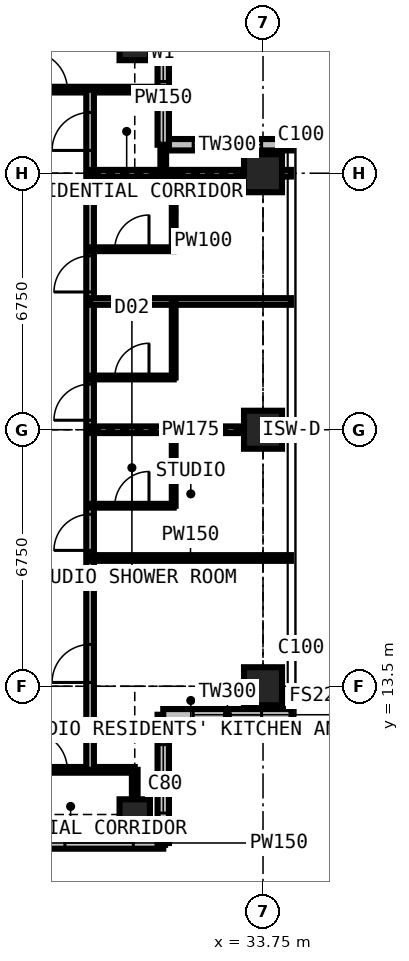
"""IFC4 building model, lengths in metres.
Left out: names, types, materials, properties, quantities, classifications, styles, units other than length and angle.
Written with IfcOpenShell. Run it as: python <this file> out.ifc"""

import sys

from ifc_helpers import new_model, si_unit, direction, frame, frame_2d, origin, origin_2d, place, context, subcontext, project, spatial, rectangle, extrude, element, fill, save


model = new_model("IFC4")
c1 = context("Model", 3, precision=1e-05, world=origin(), true_north=direction((0.0, 1.0)))
c2 = subcontext(c1, "Body", "Model", "MODEL_VIEW")
j1 = project(units=[si_unit("LENGTHUNIT", "METRE"), si_unit("PLANEANGLEUNIT", "RADIAN")], contexts=[c1])
p1 = place(None, origin())
s1 = spatial("IfcSite", under=j1, at=p1, CompositionType="ELEMENT")
p2 = place(p1, origin())
s2 = spatial("IfcBuilding", under=s1, at=p2, CompositionType="ELEMENT")
p3 = place(p2, frame((0.0, 0.0, 233.1)))
s3 = spatial("IfcBuildingStorey", under=s2, at=p3, CompositionType="ELEMENT", Elevation=233.1)
for number, where, z_axis, x_axis in (
    (1, (30.375, 10.125, 0.0), (0.0, 0.0, 1.0), (1.0, 0.0, 0.0)),
    (2, (30.375, 30.375, 0.0), (0.0, 0.0, 1.0), (1.0, 0.0, 0.0)),
):
    element("IfcColumn", number, at=place(p3, frame(where, z_axis=z_axis, x_axis=x_axis)), inside=s3, PredefinedType="COLUMN", context=c2, shape_type="SweptSolid", body=[
        extrude(rectangle(XDim=0.8, YDim=0.8, at=origin_2d()), origin(), (0.0, 0.0, 1.0), 3.6),
    ])
for number, where, z_axis, x_axis in (
    (3, (33.75, 13.5, 0.0), (0.0, 0.0, 1.0), (1.0, 0.0, 0.0)),
    (4, (33.75, 20.25, 0.0), (0.0, 0.0, 1.0), (1.0, 0.0, 0.0)),
    (5, (33.75, 27.0, 0.0), (0.0, 0.0, 1.0), (1.0, 0.0, 0.0)),
):
    element("IfcColumn", number, at=place(p3, frame(where, z_axis=z_axis, x_axis=x_axis)), inside=s3, PredefinedType="COLUMN", context=c2, shape_type="SweptSolid", body=[
        extrude(rectangle(XDim=1.0, YDim=1.0, at=origin_2d()), origin(), (0.0, 0.0, 1.0), 3.6),
    ])
p4 = place(p3, frame((34.5, 27.75, 0.0), z_axis=(0.0, 0.0, 1.0), x_axis=(-1.0, 0.0, 0.0)))
e6 = element("IfcWall", 6, at=p4, inside=s3, PredefinedType="SOLIDWALL", context=c2, shape_type="SweptSolid", body=[
    extrude(rectangle(XDim=3.375, YDim=0.3, at=frame_2d((1.688, 0.0))), origin(), (0.0, 0.0, 1.0), 3.375),
])
p5 = place(p4, frame((0.788, 0.0, 0.6)))
e7 = element("IfcOpeningElement", 7, at=p5, cuts=e6, PredefinedType="OPENING", context=c2, shape_type="SweptSolid", body=[
    extrude(rectangle(XDim=1.8, YDim=2.1, at=frame_2d((0.9, 1.05))), frame((0.0, 0.16, 0.0), z_axis=(0.0, -1.0, 0.0), x_axis=(1.0, 0.0, 0.0)), (0.0, 0.0, 1.0), 0.32),
])
p6 = place(p3, frame((31.125, 27.75, 0.0), z_axis=(0.0, 0.0, 1.0), x_axis=(0.0, 1.0, 0.0)))
e8 = element("IfcWall", 8, at=p6, inside=s3, PredefinedType="SOLIDWALL", context=c2, shape_type="SweptSolid", body=[
    extrude(rectangle(XDim=3.375, YDim=0.3, at=frame_2d((1.688, 0.0))), origin(), (0.0, 0.0, 1.0), 3.375),
])
p7 = place(p6, frame((1.663, 0.0, 0.9)))
e9 = element("IfcOpeningElement", 9, at=p7, cuts=e8, PredefinedType="OPENING", context=c2, shape_type="SweptSolid", body=[
    extrude(rectangle(XDim=1.5, YDim=1.8, at=frame_2d((0.75, 0.9))), frame((0.0, 0.16, 0.0), z_axis=(0.0, -1.0, 0.0), x_axis=(1.0, 0.0, 0.0)), (0.0, 0.0, 1.0), 0.32),
])
p8 = place(p3, frame((27.75, 9.375, 0.0), z_axis=(0.0, 0.0, 1.0), x_axis=(1.0, 0.0, 0.0)))
e10 = element("IfcWall", 10, at=p8, inside=s3, PredefinedType="SOLIDWALL", context=c2, shape_type="SweptSolid", body=[
    extrude(rectangle(XDim=3.375, YDim=0.3, at=frame_2d((1.688, 0.0))), origin(), (0.0, 0.0, 1.0), 3.375),
])
p9 = place(p8, frame((0.788, 0.0, 0.6)))
e11 = element("IfcOpeningElement", 11, at=p9, cuts=e10, PredefinedType="OPENING", context=c2, shape_type="SweptSolid", body=[
    extrude(rectangle(XDim=1.8, YDim=2.1, at=frame_2d((0.9, 1.05))), frame((0.0, 0.16, 0.0), z_axis=(0.0, -1.0, 0.0), x_axis=(1.0, 0.0, 0.0)), (0.0, 0.0, 1.0), 0.32),
])
p10 = place(p3, frame((31.125, 9.375, 0.0), z_axis=(0.0, 0.0, 1.0), x_axis=(0.0, 1.0, 0.0)))
e12 = element("IfcWall", 12, at=p10, inside=s3, PredefinedType="SOLIDWALL", context=c2, shape_type="SweptSolid", body=[
    extrude(rectangle(XDim=3.375, YDim=0.3, at=frame_2d((1.688, 0.0))), origin(), (0.0, 0.0, 1.0), 3.375),
])
p11 = place(p10, frame((0.788, 0.0, 0.6)))
e13 = element("IfcOpeningElement", 13, at=p11, cuts=e12, PredefinedType="OPENING", context=c2, shape_type="SweptSolid", body=[
    extrude(rectangle(XDim=1.8, YDim=2.1, at=frame_2d((0.9, 1.05))), frame((0.0, 0.16, 0.0), z_axis=(0.0, -1.0, 0.0), x_axis=(1.0, 0.0, 0.0)), (0.0, 0.0, 1.0), 0.32),
])
p12 = place(p3, frame((31.125, 12.75, 0.0), z_axis=(0.0, 0.0, 1.0), x_axis=(1.0, 0.0, 0.0)))
e14 = element("IfcWall", 14, at=p12, inside=s3, PredefinedType="SOLIDWALL", context=c2, shape_type="SweptSolid", body=[
    extrude(rectangle(XDim=3.375, YDim=0.3, at=frame_2d((1.688, 0.0))), origin(), (0.0, 0.0, 1.0), 3.375),
])
p13 = place(p12, frame((0.788, 0.0, 0.6)))
e15 = element("IfcOpeningElement", 15, at=p13, cuts=e14, PredefinedType="OPENING", context=c2, shape_type="SweptSolid", body=[
    extrude(rectangle(XDim=1.8, YDim=2.1, at=frame_2d((0.9, 1.05))), frame((0.0, 0.16, 0.0), z_axis=(0.0, -1.0, 0.0), x_axis=(1.0, 0.0, 0.0)), (0.0, 0.0, 1.0), 0.32),
])
p14 = place(p3, frame((11.3, 29.2, 0.0), z_axis=(0.0, 0.0, 1.0), x_axis=(1.0, 0.0, 0.0)))
e16 = element("IfcWall", 16, at=p14, inside=s3, PredefinedType="PARTITIONING", context=c2, shape_type="SweptSolid", body=[
    extrude(rectangle(XDim=19.809, YDim=0.15, at=frame_2d((9.904, 0.0))), origin(), (0.0, 0.0, 1.0), 3.375),
])
p15 = place(p14, frame((16.3, 0.0, 0.0)))
e17 = element("IfcOpeningElement", 17, at=p15, cuts=e16, PredefinedType="OPENING", context=c2, shape_type="SweptSolid", body=[
    extrude(rectangle(XDim=1.0, YDim=2.2, at=frame_2d((0.5, 1.1))), frame((0.0, 0.085, 0.0), z_axis=(0.0, -1.0, 0.0), x_axis=(1.0, 0.0, 0.0)), (0.0, 0.0, 1.0), 0.17),
])
p16 = place(p14, frame((5.825, 0.0, 0.0)))
e18 = element("IfcOpeningElement", 18, at=p16, cuts=e16, PredefinedType="OPENING", context=c2, shape_type="SweptSolid", body=[
    extrude(rectangle(XDim=0.95, YDim=2.2, at=frame_2d((0.475, 1.1))), frame((0.0, 0.085, 0.0), z_axis=(0.0, -1.0, 0.0), x_axis=(1.0, 0.0, 0.0)), (0.0, 0.0, 1.0), 0.17),
])
p17 = place(p14, frame((9.2, 0.0, 0.0)))
e19 = element("IfcOpeningElement", 19, at=p17, cuts=e16, PredefinedType="OPENING", context=c2, shape_type="SweptSolid", body=[
    extrude(rectangle(XDim=0.95, YDim=2.2, at=frame_2d((0.475, 1.1))), frame((0.0, 0.085, 0.0), z_axis=(0.0, -1.0, 0.0), x_axis=(1.0, 0.0, 0.0)), (0.0, 0.0, 1.0), 0.17),
])
p18 = place(p14, frame((12.575, 0.0, 0.0)))
e20 = element("IfcOpeningElement", 20, at=p18, cuts=e16, PredefinedType="OPENING", context=c2, shape_type="SweptSolid", body=[
    extrude(rectangle(XDim=0.95, YDim=2.2, at=frame_2d((0.475, 1.1))), frame((0.0, 0.085, 0.0), z_axis=(0.0, -1.0, 0.0), x_axis=(1.0, 0.0, 0.0)), (0.0, 0.0, 1.0), 0.17),
])
p19 = place(p14, frame((0.6, 0.0, 0.0)))
e21 = element("IfcOpeningElement", 21, at=p19, cuts=e16, PredefinedType="OPENING", context=c2, shape_type="SweptSolid", body=[
    extrude(rectangle(XDim=1.0, YDim=2.2, at=frame_2d((0.5, 1.1))), frame((0.0, 0.085, 0.0), z_axis=(0.0, -1.0, 0.0), x_axis=(1.0, 0.0, 0.0)), (0.0, 0.0, 1.0), 0.17),
])
p20 = place(p3, frame((27.0, 11.3, 0.0), z_axis=(0.0, 0.0, 1.0), x_axis=(1.0, 0.0, 0.0)))
e22 = element("IfcWall", 22, at=p20, inside=s3, PredefinedType="PARTITIONING", context=c2, shape_type="SweptSolid", body=[
    extrude(rectangle(XDim=3.375, YDim=0.15, at=frame_2d((1.688, 0.0))), origin(), (0.0, 0.0, 1.0), 3.375),
])
p21 = place(p20, frame((0.6, 0.0, 0.0)))
e23 = element("IfcOpeningElement", 23, at=p21, cuts=e22, PredefinedType="OPENING", context=c2, shape_type="SweptSolid", body=[
    extrude(rectangle(XDim=1.0, YDim=2.2, at=frame_2d((0.5, 1.1))), frame((0.0, 0.085, 0.0), z_axis=(0.0, -1.0, 0.0), x_axis=(1.0, 0.0, 0.0)), (0.0, 0.0, 1.0), 0.17),
])
p22 = place(p3, frame((29.2, 11.3, 0.0), z_axis=(0.0, 0.0, 1.0), x_axis=(0.0, 1.0, 0.0)))
e24 = element("IfcWall", 24, at=p22, inside=s3, PredefinedType="PARTITIONING", context=c2, shape_type="SweptSolid", body=[
    extrude(rectangle(XDim=17.9, YDim=0.2, at=frame_2d((8.95, 0.0))), origin(), (0.0, 0.0, 1.0), 3.375),
])
p23 = place(p22, frame((2.3, 0.0, 0.0)))
e25 = element("IfcOpeningElement", 25, at=p23, cuts=e24, PredefinedType="OPENING", context=c2, shape_type="SweptSolid", body=[
    extrude(rectangle(XDim=1.0, YDim=2.2, at=frame_2d((0.5, 1.1))), frame((0.0, 0.11, 0.0), z_axis=(0.0, -1.0, 0.0), x_axis=(1.0, 0.0, 0.0)), (0.0, 0.0, 1.0), 0.22),
])
p24 = place(p22, frame((5.775, 0.0, 0.0)))
e26 = element("IfcOpeningElement", 26, at=p24, cuts=e24, PredefinedType="OPENING", context=c2, shape_type="SweptSolid", body=[
    extrude(rectangle(XDim=0.95, YDim=2.2, at=frame_2d((0.475, 1.1))), frame((0.0, 0.11, 0.0), z_axis=(0.0, -1.0, 0.0), x_axis=(1.0, 0.0, 0.0)), (0.0, 0.0, 1.0), 0.22),
])
p25 = place(p22, frame((9.2, 0.0, 0.0)))
e27 = element("IfcOpeningElement", 27, at=p25, cuts=e24, PredefinedType="OPENING", context=c2, shape_type="SweptSolid", body=[
    extrude(rectangle(XDim=0.95, YDim=2.2, at=frame_2d((0.475, 1.1))), frame((0.0, 0.11, 0.0), z_axis=(0.0, -1.0, 0.0), x_axis=(1.0, 0.0, 0.0)), (0.0, 0.0, 1.0), 0.22),
])
p26 = place(p22, frame((12.575, 0.0, 0.0)))
e28 = element("IfcOpeningElement", 28, at=p26, cuts=e24, PredefinedType="OPENING", context=c2, shape_type="SweptSolid", body=[
    extrude(rectangle(XDim=0.95, YDim=2.2, at=frame_2d((0.475, 1.1))), frame((0.0, 0.11, 0.0), z_axis=(0.0, -1.0, 0.0), x_axis=(1.0, 0.0, 0.0)), (0.0, 0.0, 1.0), 0.22),
])
p27 = place(p22, frame((16.3, 0.0, 0.0)))
e29 = element("IfcOpeningElement", 29, at=p27, cuts=e24, PredefinedType="OPENING", context=c2, shape_type="SweptSolid", body=[
    extrude(rectangle(XDim=1.0, YDim=2.2, at=frame_2d((0.5, 1.1))), frame((0.0, 0.11, 0.0), z_axis=(0.0, -1.0, 0.0), x_axis=(1.0, 0.0, 0.0)), (0.0, 0.0, 1.0), 0.22),
])
p28 = place(p3, frame((29.2, 16.875, 0.0), z_axis=(0.0, 0.0, 1.0), x_axis=(1.0, 0.0, 0.0)))
e30 = element("IfcWall", 30, at=p28, inside=s3, PredefinedType="PARTITIONING", context=c2, shape_type="SweptSolid", body=[
    extrude(rectangle(XDim=5.284, YDim=0.15, at=frame_2d((2.642, 0.0))), origin(), (0.0, 0.0, 1.0), 3.375),
])
p29 = place(p3, frame((29.2, 18.25, 0.0), z_axis=(0.0, 0.0, 1.0), x_axis=(1.0, 0.0, 0.0)))
e31 = element("IfcWall", 31, at=p29, inside=s3, PredefinedType="PARTITIONING", context=c2, shape_type="SweptSolid", body=[
    extrude(rectangle(XDim=2.2, YDim=0.1, at=frame_2d((1.1, 0.0))), origin(), (0.0, 0.0, 1.0), 3.375),
])
p30 = place(p29, frame((0.65, 0.0, 0.0)))
e32 = element("IfcOpeningElement", 32, at=p30, cuts=e31, PredefinedType="OPENING", context=c2, shape_type="SweptSolid", body=[
    extrude(rectangle(XDim=0.9, YDim=2.2, at=frame_2d((0.45, 1.1))), frame((0.0, 0.06, 0.0), z_axis=(0.0, -1.0, 0.0), x_axis=(1.0, 0.0, 0.0)), (0.0, 0.0, 1.0), 0.12),
])
p31 = place(p3, frame((29.2, 20.25, 0.0), z_axis=(0.0, 0.0, 1.0), x_axis=(1.0, 0.0, 0.0)))
e33 = element("IfcWall", 33, at=p31, inside=s3, PredefinedType="PARTITIONING", context=c2, shape_type="SweptSolid", body=[
    extrude(rectangle(XDim=5.284, YDim=0.175, at=frame_2d((2.642, 0.0))), origin(), (0.0, 0.0, 1.0), 2.877),
])
p32 = place(p3, frame((29.2, 21.625, 0.0), z_axis=(0.0, 0.0, 1.0), x_axis=(1.0, 0.0, 0.0)))
e34 = element("IfcWall", 34, at=p32, inside=s3, PredefinedType="PARTITIONING", context=c2, shape_type="SweptSolid", body=[
    extrude(rectangle(XDim=2.2, YDim=0.1, at=frame_2d((1.1, 0.0))), origin(), (0.0, 0.0, 1.0), 3.375),
])
p33 = place(p32, frame((0.65, 0.0, 0.0)))
e35 = element("IfcOpeningElement", 35, at=p33, cuts=e34, PredefinedType="OPENING", context=c2, shape_type="SweptSolid", body=[
    extrude(rectangle(XDim=0.9, YDim=2.2, at=frame_2d((0.45, 1.1))), frame((0.0, 0.06, 0.0), z_axis=(0.0, -1.0, 0.0), x_axis=(1.0, 0.0, 0.0)), (0.0, 0.0, 1.0), 0.12),
])
p34 = place(p3, frame((29.2, 23.625, 0.0), z_axis=(0.0, 0.0, 1.0), x_axis=(1.0, 0.0, 0.0)))
e36 = element("IfcWall", 36, at=p34, inside=s3, PredefinedType="PARTITIONING", context=c2, shape_type="SweptSolid", body=[
    extrude(rectangle(XDim=5.284, YDim=0.175, at=frame_2d((2.642, 0.0))), origin(), (0.0, 0.0, 1.0), 3.375),
])
p35 = place(p3, frame((29.2, 25.0, 0.0), z_axis=(0.0, 0.0, 1.0), x_axis=(1.0, 0.0, 0.0)))
e37 = element("IfcWall", 37, at=p35, inside=s3, PredefinedType="PARTITIONING", context=c2, shape_type="SweptSolid", body=[
    extrude(rectangle(XDim=2.2, YDim=0.1, at=frame_2d((1.1, 0.0))), origin(), (0.0, 0.0, 1.0), 3.375),
])
p36 = place(p35, frame((0.65, 0.0, 0.0)))
e38 = element("IfcOpeningElement", 38, at=p36, cuts=e37, PredefinedType="OPENING", context=c2, shape_type="SweptSolid", body=[
    extrude(rectangle(XDim=0.9, YDim=2.2, at=frame_2d((0.45, 1.1))), frame((0.0, 0.06, 0.0), z_axis=(0.0, -1.0, 0.0), x_axis=(1.0, 0.0, 0.0)), (0.0, 0.0, 1.0), 0.12),
])
p37 = place(p3, frame((29.2, 27.0, 0.0), z_axis=(0.0, 0.0, 1.0), x_axis=(1.0, 0.0, 0.0)))
e39 = element("IfcWall", 39, at=p37, inside=s3, PredefinedType="PARTITIONING", context=c2, shape_type="SweptSolid", body=[
    extrude(rectangle(XDim=5.284, YDim=0.175, at=frame_2d((2.642, 0.0))), origin(), (0.0, 0.0, 1.0), 2.877),
])
p38 = place(p3, frame((30.375, 9.525, 0.0), z_axis=(0.0, 0.0, 1.0), x_axis=(0.0, 1.0, 0.0)))
e40 = element("IfcWall", 40, at=p38, inside=s3, PredefinedType="PARTITIONING", context=c2, shape_type="SweptSolid", body=[
    extrude(rectangle(XDim=1.775, YDim=0.15, at=frame_2d((0.888, 0.0))), origin(), (0.0, 0.0, 1.0), 2.877),
])
p39 = place(p3, frame((31.125, 27.0, 0.0), z_axis=(0.0, 0.0, 1.0), x_axis=(0.0, 1.0, 0.0)))
e41 = element("IfcWall", 41, at=p39, inside=s3, PredefinedType="PARTITIONING", context=c2, shape_type="SweptSolid", body=[
    extrude(rectangle(XDim=0.734, YDim=0.15, at=frame_2d((0.367, 0.0))), origin(), (0.0, 0.0, 1.0), 3.375),
])
for number, where, z_axis, x_axis in (
    (42, (31.4, 18.25, 0.0), (0.0, 0.0, 1.0), (0.0, 1.0, 0.0)),
    (43, (31.4, 21.625, 0.0), (0.0, 0.0, 1.0), (0.0, 1.0, 0.0)),
    (44, (31.4, 25.0, 0.0), (0.0, 0.0, 1.0), (0.0, 1.0, 0.0)),
):
    element("IfcWall", number, at=place(p3, frame(where, z_axis=z_axis, x_axis=x_axis)), inside=s3, PredefinedType="PARTITIONING", context=c2, shape_type="SweptSolid", body=[
        extrude(rectangle(XDim=2.0, YDim=0.1, at=frame_2d((1.0, 0.0))), origin(), (0.0, 0.0, 1.0), 3.375),
    ])
p40 = place(p5, origin())
e45 = element("IfcWindow", 45, at=p40, inside=s3, PartitioningType="SINGLE_PANEL", PredefinedType="WINDOW", context=c2, shape_type="SweptSolid", body=[
    extrude(rectangle(XDim=1.8, YDim=2.1, at=frame_2d((0.9, 1.05))), frame((0.0, 0.03, 0.0), z_axis=(0.0, -1.0, 0.0), x_axis=(1.0, 0.0, 0.0)), (0.0, 0.0, 1.0), 0.06),
])
fill(e7, e45)
p41 = place(p7, origin())
e46 = element("IfcWindow", 46, at=p41, inside=s3, PartitioningType="SINGLE_PANEL", PredefinedType="WINDOW", context=c2, shape_type="SweptSolid", body=[
    extrude(rectangle(XDim=1.5, YDim=1.8, at=frame_2d((0.75, 0.9))), frame((0.0, 0.03, 0.0), z_axis=(0.0, -1.0, 0.0), x_axis=(1.0, 0.0, 0.0)), (0.0, 0.0, 1.0), 0.06),
])
fill(e9, e46)
p42 = place(p9, origin())
e47 = element("IfcWindow", 47, at=p42, inside=s3, PartitioningType="SINGLE_PANEL", PredefinedType="WINDOW", context=c2, shape_type="SweptSolid", body=[
    extrude(rectangle(XDim=1.8, YDim=2.1, at=frame_2d((0.9, 1.05))), frame((0.0, 0.03, 0.0), z_axis=(0.0, -1.0, 0.0), x_axis=(1.0, 0.0, 0.0)), (0.0, 0.0, 1.0), 0.06),
])
fill(e11, e47)
p43 = place(p11, origin())
e48 = element("IfcWindow", 48, at=p43, inside=s3, PartitioningType="SINGLE_PANEL", PredefinedType="WINDOW", context=c2, shape_type="SweptSolid", body=[
    extrude(rectangle(XDim=1.8, YDim=2.1, at=frame_2d((0.9, 1.05))), frame((0.0, 0.03, 0.0), z_axis=(0.0, -1.0, 0.0), x_axis=(1.0, 0.0, 0.0)), (0.0, 0.0, 1.0), 0.06),
])
fill(e13, e48)
p44 = place(p13, origin())
e49 = element("IfcWindow", 49, at=p44, inside=s3, PartitioningType="SINGLE_PANEL", PredefinedType="WINDOW", context=c2, shape_type="SweptSolid", body=[
    extrude(rectangle(XDim=1.8, YDim=2.1, at=frame_2d((0.9, 1.05))), frame((0.0, 0.03, 0.0), z_axis=(0.0, -1.0, 0.0), x_axis=(1.0, 0.0, 0.0)), (0.0, 0.0, 1.0), 0.06),
])
fill(e15, e49)
p45 = place(p21, origin())
e50 = element("IfcDoor", 50, at=p45, inside=s3, OperationType="SINGLE_SWING_LEFT", PredefinedType="DOOR", context=c2, shape_type="SweptSolid", body=[
    extrude(rectangle(XDim=1.0, YDim=2.2, at=frame_2d((0.5, 1.1))), frame((0.0, 0.025, 0.0), z_axis=(0.0, -1.0, 0.0), x_axis=(1.0, 0.0, 0.0)), (0.0, 0.0, 1.0), 0.05),
])
fill(e23, e50)
p46 = place(p23, origin())
e51 = element("IfcDoor", 51, at=p46, inside=s3, OperationType="SINGLE_SWING_LEFT", PredefinedType="DOOR", context=c2, shape_type="SweptSolid", body=[
    extrude(rectangle(XDim=1.0, YDim=2.2, at=frame_2d((0.5, 1.1))), frame((0.0, 0.025, 0.0), z_axis=(0.0, -1.0, 0.0), x_axis=(1.0, 0.0, 0.0)), (0.0, 0.0, 1.0), 0.05),
])
fill(e25, e51)
p47 = place(p24, origin())
e52 = element("IfcDoor", 52, at=p47, inside=s3, OperationType="SINGLE_SWING_LEFT", PredefinedType="DOOR", context=c2, shape_type="SweptSolid", body=[
    extrude(rectangle(XDim=0.95, YDim=2.2, at=frame_2d((0.475, 1.1))), frame((0.0, 0.025, 0.0), z_axis=(0.0, -1.0, 0.0), x_axis=(1.0, 0.0, 0.0)), (0.0, 0.0, 1.0), 0.05),
])
fill(e26, e52)
p48 = place(p30, origin())
e53 = element("IfcDoor", 53, at=p48, inside=s3, OperationType="SINGLE_SWING_RIGHT", PredefinedType="DOOR", context=c2, shape_type="SweptSolid", body=[
    extrude(rectangle(XDim=0.9, YDim=2.2, at=frame_2d((0.45, 1.1))), frame((0.0, 0.025, 0.0), z_axis=(0.0, -1.0, 0.0), x_axis=(1.0, 0.0, 0.0)), (0.0, 0.0, 1.0), 0.05),
])
fill(e32, e53)
p49 = place(p25, origin())
e54 = element("IfcDoor", 54, at=p49, inside=s3, OperationType="SINGLE_SWING_LEFT", PredefinedType="DOOR", context=c2, shape_type="SweptSolid", body=[
    extrude(rectangle(XDim=0.95, YDim=2.2, at=frame_2d((0.475, 1.1))), frame((0.0, 0.025, 0.0), z_axis=(0.0, -1.0, 0.0), x_axis=(1.0, 0.0, 0.0)), (0.0, 0.0, 1.0), 0.05),
])
fill(e27, e54)
p50 = place(p33, origin())
e55 = element("IfcDoor", 55, at=p50, inside=s3, OperationType="SINGLE_SWING_RIGHT", PredefinedType="DOOR", context=c2, shape_type="SweptSolid", body=[
    extrude(rectangle(XDim=0.9, YDim=2.2, at=frame_2d((0.45, 1.1))), frame((0.0, 0.025, 0.0), z_axis=(0.0, -1.0, 0.0), x_axis=(1.0, 0.0, 0.0)), (0.0, 0.0, 1.0), 0.05),
])
fill(e35, e55)
p51 = place(p26, origin())
e56 = element("IfcDoor", 56, at=p51, inside=s3, OperationType="SINGLE_SWING_LEFT", PredefinedType="DOOR", context=c2, shape_type="SweptSolid", body=[
    extrude(rectangle(XDim=0.95, YDim=2.2, at=frame_2d((0.475, 1.1))), frame((0.0, 0.025, 0.0), z_axis=(0.0, -1.0, 0.0), x_axis=(1.0, 0.0, 0.0)), (0.0, 0.0, 1.0), 0.05),
])
fill(e28, e56)
p52 = place(p36, origin())
e57 = element("IfcDoor", 57, at=p52, inside=s3, OperationType="SINGLE_SWING_RIGHT", PredefinedType="DOOR", context=c2, shape_type="SweptSolid", body=[
    extrude(rectangle(XDim=0.9, YDim=2.2, at=frame_2d((0.45, 1.1))), frame((0.0, 0.025, 0.0), z_axis=(0.0, -1.0, 0.0), x_axis=(1.0, 0.0, 0.0)), (0.0, 0.0, 1.0), 0.05),
])
fill(e38, e57)
p53 = place(p27, origin())
e58 = element("IfcDoor", 58, at=p53, inside=s3, OperationType="SINGLE_SWING_LEFT", PredefinedType="DOOR", context=c2, shape_type="SweptSolid", body=[
    extrude(rectangle(XDim=1.0, YDim=2.2, at=frame_2d((0.5, 1.1))), frame((0.0, 0.025, 0.0), z_axis=(0.0, -1.0, 0.0), x_axis=(1.0, 0.0, 0.0)), (0.0, 0.0, 1.0), 0.05),
])
fill(e29, e58)
p54 = place(p15, origin())
e59 = element("IfcDoor", 59, at=p54, inside=s3, OperationType="SINGLE_SWING_LEFT", PredefinedType="DOOR", context=c2, shape_type="SweptSolid", body=[
    extrude(rectangle(XDim=1.0, YDim=2.2, at=frame_2d((0.5, 1.1))), frame((0.0, 0.025, 0.0), z_axis=(0.0, -1.0, 0.0), x_axis=(1.0, 0.0, 0.0)), (0.0, 0.0, 1.0), 0.05),
])
fill(e17, e59)
save(model, sys.argv[1])
